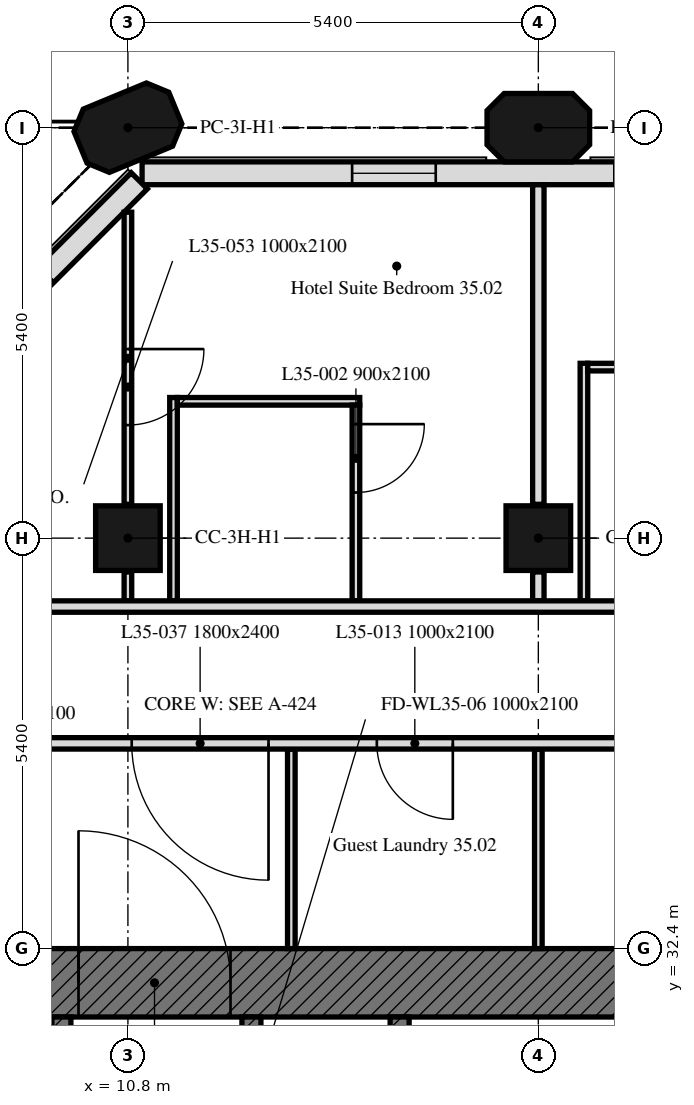
"""IFC4 building model, lengths in metres.
Left out: names, types, materials, properties, quantities, classifications, styles, units other than length and angle.
Written with IfcOpenShell. Run it as: python <this file> out.ifc"""

import sys

from ifc_helpers import new_model, si_unit, direction, frame, frame_2d, origin, origin_2d, place, context, subcontext, project, spatial, polyline, rectangle, outline, extrude, element, fill, save


model = new_model("IFC4")
c1 = context("Model", 3, precision=1e-05, world=origin(), true_north=direction((0.0, 1.0)))
c2 = subcontext(c1, "Body", "Model", "MODEL_VIEW")
j1 = project(units=[si_unit("LENGTHUNIT", "METRE"), si_unit("PLANEANGLEUNIT", "RADIAN")], contexts=[c1])
p1 = place(None, origin())
s1 = spatial("IfcSite", under=j1, at=p1, CompositionType="ELEMENT")
p2 = place(p1, origin())
s2 = spatial("IfcBuilding", under=s1, at=p2, CompositionType="ELEMENT")
p3 = place(p2, frame((0.0, 0.0, 152.8)))
s3 = spatial("IfcBuildingStorey", under=s2, at=p3, CompositionType="ELEMENT", Elevation=152.8)
for number, where, z_axis, x_axis in (
    (1, (10.8, 37.8, 0.0), (0.0, 0.0, 1.0), (1.0, 0.0, 0.0)),
    (2, (16.2, 37.8, 0.0), (0.0, 0.0, 1.0), (1.0, 0.0, 0.0)),
):
    element("IfcColumn", number, at=place(p3, frame(where, z_axis=z_axis, x_axis=x_axis)), inside=s3, PredefinedType="COLUMN", context=c2, shape_type="SweptSolid", body=[
        extrude(rectangle(XDim=0.85, YDim=0.85, at=origin_2d()), origin(), (0.0, 0.0, 1.0), 3.0),
    ])
for number, where, z_axis, x_axis in (
    (3, (10.8, 43.2, 0.0), (0.0, 0.0, 1.0), (0.924, 0.383, 0.0)),
    (4, (16.2, 43.2, 0.0), (0.0, 0.0, 1.0), (1.0, 0.0, 0.0)),
):
    element("IfcColumn", number, at=place(p3, frame(where, z_axis=z_axis, x_axis=x_axis)), inside=s3, PredefinedType="COLUMN", context=c2, shape_type="SweptSolid", body=[
        extrude(outline(polyline([(-0.45, -0.45), (0.45, -0.45), (0.675, -0.225), (0.675, 0.225), (0.45, 0.45), (-0.45, 0.45), (-0.675, 0.225), (-0.675, -0.225), (-0.45, -0.45)])), origin(), (0.0, 0.0, 1.0), 3.0),
    ])
p4 = place(p3, frame((43.014, 42.6, 0.0), z_axis=(0.0, 0.0, 1.0), x_axis=(-1.0, 0.0, 0.0)))
e5 = element("IfcWall", 5, at=p4, inside=s3, PredefinedType="SOLIDWALL", context=c2, shape_type="SweptSolid", body=[
    extrude(rectangle(XDim=32.027, YDim=0.3, at=frame_2d((16.014, 0.0))), origin(), (0.0, 0.0, 1.0), 3.0),
])
p5 = place(p4, frame((0.814, 0.0, 0.9)))
e6 = element("IfcOpeningElement", 6, at=p5, cuts=e5, PredefinedType="OPENING", context=c2, shape_type="SweptSolid", body=[
    extrude(rectangle(XDim=3.4, YDim=1.7, at=frame_2d((1.7, 0.85))), frame((0.0, 0.16, 0.0), z_axis=(0.0, -1.0, 0.0), x_axis=(1.0, 0.0, 0.0)), (0.0, 0.0, 1.0), 0.32),
])
p6 = place(p4, frame((6.564, 0.0, 0.9)))
e7 = element("IfcOpeningElement", 7, at=p6, cuts=e5, PredefinedType="OPENING", context=c2, shape_type="SweptSolid", body=[
    extrude(rectangle(XDim=1.1, YDim=1.7, at=frame_2d((0.55, 0.85))), frame((0.0, 0.16, 0.0), z_axis=(0.0, -1.0, 0.0), x_axis=(1.0, 0.0, 0.0)), (0.0, 0.0, 1.0), 0.32),
])
p7 = place(p4, frame((11.614, 0.0, 0.9)))
e8 = element("IfcOpeningElement", 8, at=p7, cuts=e5, PredefinedType="OPENING", context=c2, shape_type="SweptSolid", body=[
    extrude(rectangle(XDim=3.4, YDim=1.7, at=frame_2d((1.7, 0.85))), frame((0.0, 0.16, 0.0), z_axis=(0.0, -1.0, 0.0), x_axis=(1.0, 0.0, 0.0)), (0.0, 0.0, 1.0), 0.32),
])
p8 = place(p4, frame((17.364, 0.0, 0.9)))
e9 = element("IfcOpeningElement", 9, at=p8, cuts=e5, PredefinedType="OPENING", context=c2, shape_type="SweptSolid", body=[
    extrude(rectangle(XDim=1.1, YDim=1.7, at=frame_2d((0.55, 0.85))), frame((0.0, 0.16, 0.0), z_axis=(0.0, -1.0, 0.0), x_axis=(1.0, 0.0, 0.0)), (0.0, 0.0, 1.0), 0.32),
])
p9 = place(p4, frame((22.414, 0.0, 0.9)))
e10 = element("IfcOpeningElement", 10, at=p9, cuts=e5, PredefinedType="OPENING", context=c2, shape_type="SweptSolid", body=[
    extrude(rectangle(XDim=3.4, YDim=1.7, at=frame_2d((1.7, 0.85))), frame((0.0, 0.16, 0.0), z_axis=(0.0, -1.0, 0.0), x_axis=(1.0, 0.0, 0.0)), (0.0, 0.0, 1.0), 0.32),
])
p10 = place(p4, frame((28.164, 0.0, 0.9)))
e11 = element("IfcOpeningElement", 11, at=p10, cuts=e5, PredefinedType="OPENING", context=c2, shape_type="SweptSolid", body=[
    extrude(rectangle(XDim=1.1, YDim=1.7, at=frame_2d((0.55, 0.85))), frame((0.0, 0.16, 0.0), z_axis=(0.0, -1.0, 0.0), x_axis=(1.0, 0.0, 0.0)), (0.0, 0.0, 1.0), 0.32),
])
p11 = place(p3, frame((10.949, 42.501, 0.0), z_axis=(0.0, 0.0, 1.0), x_axis=(-0.707106781187, -0.707106781187, 0.0)))
e12 = element("IfcWall", 12, at=p11, inside=s3, PredefinedType="SOLIDWALL", context=c2, shape_type="SweptSolid", body=[
    extrude(rectangle(XDim=6.86, YDim=0.3, at=frame_2d((3.43, 0.0))), origin(), (0.0, 0.0, 1.0), 3.0),
])
p12 = place(p11, frame((1.73, 0.0, 0.9)))
e13 = element("IfcOpeningElement", 13, at=p12, cuts=e12, PredefinedType="OPENING", context=c2, shape_type="SweptSolid", body=[
    extrude(rectangle(XDim=3.4, YDim=1.7, at=frame_2d((1.7, 0.85))), frame((0.0, 0.16, 0.0), z_axis=(0.0, -1.0, 0.0), x_axis=(1.0, 0.0, 0.0)), (0.0, 0.0, 1.0), 0.32),
])
p13 = place(p3, frame((6.6, 31.95, 0.0), z_axis=(0.0, 0.0, 1.0), x_axis=(1.0, 0.0, 0.0)))
e14 = element("IfcWall", 14, at=p13, inside=s3, PredefinedType="SOLIDWALL", context=c2, shape_type="SweptSolid", body=[
    extrude(rectangle(XDim=11.1, YDim=0.9, at=frame_2d((5.55, 0.0))), origin(), (0.0, 0.0, 1.0), 3.0),
])
p14 = place(p13, frame((3.55, 0.0, 0.0)))
e15 = element("IfcOpeningElement", 15, at=p14, cuts=e14, PredefinedType="OPENING", context=c2, shape_type="SweptSolid", body=[
    extrude(rectangle(XDim=2.0, YDim=2.4, at=frame_2d((1.0, 1.2))), frame((0.0, 0.45, 0.0), z_axis=(0.0, -1.0, 0.0), x_axis=(1.0, 0.0, 0.0)), (0.0, 0.0, 1.0), 0.9),
])
p15 = place(p3, frame((9.925, 17.1, 0.0), z_axis=(0.0, 0.0, 1.0), x_axis=(0.0, 1.0, 0.0)))
e16 = element("IfcWall", 16, at=p15, inside=s3, PredefinedType="SOLIDWALL", context=c2, shape_type="SweptSolid", body=[
    extrude(rectangle(XDim=14.4, YDim=0.25, at=frame_2d((7.2, 0.0))), origin(), (0.0, 0.0, 1.0), 3.0),
])
p16 = place(p15, frame((4.6, 0.0, 0.0)))
e17 = element("IfcOpeningElement", 17, at=p16, cuts=e16, PredefinedType="OPENING", context=c2, shape_type="SweptSolid", body=[
    extrude(rectangle(XDim=1.0, YDim=2.1, at=frame_2d((0.5, 1.05))), frame((0.0, 0.125, 0.0), z_axis=(0.0, -1.0, 0.0), x_axis=(1.0, 0.0, 0.0)), (0.0, 0.0, 1.0), 0.25),
])
p17 = place(p15, frame((7.062, 0.0, 0.0)))
e18 = element("IfcOpeningElement", 18, at=p17, cuts=e16, PredefinedType="OPENING", context=c2, shape_type="SweptSolid", body=[
    extrude(rectangle(XDim=1.2, YDim=2.1, at=frame_2d((0.6, 1.05))), frame((0.0, 0.125, 0.0), z_axis=(0.0, -1.0, 0.0), x_axis=(1.0, 0.0, 0.0)), (0.0, 0.0, 1.0), 0.25),
])
p18 = place(p15, frame((9.472, 0.0, 0.0)))
e19 = element("IfcOpeningElement", 19, at=p18, cuts=e16, PredefinedType="OPENING", context=c2, shape_type="SweptSolid", body=[
    extrude(rectangle(XDim=0.9, YDim=2.1, at=frame_2d((0.45, 1.05))), frame((0.0, 0.125, 0.0), z_axis=(0.0, -1.0, 0.0), x_axis=(1.0, 0.0, 0.0)), (0.0, 0.0, 1.0), 0.25),
])
p19 = place(p15, frame((11.159, 0.0, 0.0)))
e20 = element("IfcOpeningElement", 20, at=p19, cuts=e16, PredefinedType="OPENING", context=c2, shape_type="SweptSolid", body=[
    extrude(rectangle(XDim=0.9, YDim=2.1, at=frame_2d((0.45, 1.05))), frame((0.0, 0.125, 0.0), z_axis=(0.0, -1.0, 0.0), x_axis=(1.0, 0.0, 0.0)), (0.0, 0.0, 1.0), 0.25),
])
p20 = place(p15, frame((13.1, 0.0, 0.0)))
e21 = element("IfcOpeningElement", 21, at=p20, cuts=e16, PredefinedType="OPENING", context=c2, shape_type="SweptSolid", body=[
    extrude(rectangle(XDim=0.9, YDim=2.1, at=frame_2d((0.45, 1.05))), frame((0.0, 0.125, 0.0), z_axis=(0.0, -1.0, 0.0), x_axis=(1.0, 0.0, 0.0)), (0.0, 0.0, 1.0), 0.25),
])
p21 = place(p3, frame((14.375, 17.1, 0.0), z_axis=(0.0, 0.0, 1.0), x_axis=(0.0, 1.0, 0.0)))
e22 = element("IfcWall", 22, at=p21, inside=s3, PredefinedType="SOLIDWALL", context=c2, shape_type="SweptSolid", body=[
    extrude(rectangle(XDim=14.4, YDim=0.25, at=frame_2d((7.2, 0.0))), origin(), (0.0, 0.0, 1.0), 3.0),
])
p22 = place(p21, frame((13.15, 0.0, 0.0)))
e23 = element("IfcOpeningElement", 23, at=p22, cuts=e22, PredefinedType="OPENING", context=c2, shape_type="SweptSolid", body=[
    extrude(rectangle(XDim=1.0, YDim=2.1, at=frame_2d((0.5, 1.05))), frame((0.0, 0.125, 0.0), z_axis=(0.0, -1.0, 0.0), x_axis=(1.0, 0.0, 0.0)), (0.0, 0.0, 1.0), 0.25),
])
p23 = place(p21, frame((0.6, 0.0, 0.0)))
e24 = element("IfcOpeningElement", 24, at=p23, cuts=e22, PredefinedType="OPENING", context=c2, shape_type="SweptSolid", body=[
    extrude(rectangle(XDim=1.1, YDim=2.1, at=frame_2d((0.55, 1.05))), frame((0.0, 0.125, 0.0), z_axis=(0.0, -1.0, 0.0), x_axis=(1.0, 0.0, 0.0)), (0.0, 0.0, 1.0), 0.25),
])
p24 = place(p21, frame((3.25, 0.0, 0.0)))
e25 = element("IfcOpeningElement", 25, at=p24, cuts=e22, PredefinedType="OPENING", context=c2, shape_type="SweptSolid", body=[
    extrude(rectangle(XDim=0.9, YDim=2.1, at=frame_2d((0.45, 1.05))), frame((0.0, 0.125, 0.0), z_axis=(0.0, -1.0, 0.0), x_axis=(1.0, 0.0, 0.0)), (0.0, 0.0, 1.0), 0.25),
])
p25 = place(p3, frame((12.425, 29.4, 0.0), z_axis=(0.0, 0.0, 1.0), x_axis=(0.0, 1.0, 0.0)))
e26 = element("IfcWall", 26, at=p25, inside=s3, PredefinedType="SOLIDWALL", context=c2, shape_type="SweptSolid", body=[
    extrude(rectangle(XDim=2.1, YDim=0.25, at=frame_2d((1.05, 0.0))), origin(), (0.0, 0.0, 1.0), 3.0),
])
p26 = place(p25, frame((0.5, 0.0, 0.0)))
e27 = element("IfcOpeningElement", 27, at=p26, cuts=e26, PredefinedType="OPENING", context=c2, shape_type="SweptSolid", body=[
    extrude(rectangle(XDim=1.0, YDim=2.1, at=frame_2d((0.5, 1.05))), frame((0.0, 0.125, 0.0), z_axis=(0.0, -1.0, 0.0), x_axis=(1.0, 0.0, 0.0)), (0.0, 0.0, 1.0), 0.25),
])
p27 = place(p3, frame((10.8, 42.088, 0.0), z_axis=(0.0, 0.0, 1.0), x_axis=(0.0, -1.0, 0.0)))
e28 = element("IfcWall", 28, at=p27, inside=s3, PredefinedType="PARTITIONING", context=c2, shape_type="SweptSolid", body=[
    extrude(rectangle(XDim=3.843, YDim=0.1, at=frame_2d((1.921, 0.0))), origin(), (0.0, 0.0, 1.0), 3.0),
])
p28 = place(p27, frame((1.8, 0.0, 0.0)))
e29 = element("IfcOpeningElement", 29, at=p28, cuts=e28, PredefinedType="OPENING", context=c2, shape_type="SweptSolid", body=[
    extrude(rectangle(XDim=1.0, YDim=2.1, at=frame_2d((0.5, 1.05))), frame((0.0, 0.05, 0.0), z_axis=(0.0, -1.0, 0.0), x_axis=(1.0, 0.0, 0.0)), (0.0, 0.0, 1.0), 0.1),
])
p29 = place(p3, frame((10.8, 37.355, 0.0), z_axis=(0.0, 0.0, 1.0), x_axis=(0.0, -1.0, 0.0)))
e30 = element("IfcWall", 30, at=p29, inside=s3, PredefinedType="PARTITIONING", context=c2, shape_type="SweptSolid", body=[
    extrude(rectangle(XDim=0.38, YDim=0.1, at=frame_2d((0.19, 0.0))), origin(), (0.0, 0.0, 1.0), 3.0),
])
p30 = place(p3, frame((11.4, 36.975, 0.0), z_axis=(0.0, 0.0, 1.0), x_axis=(0.0, 1.0, 0.0)))
e31 = element("IfcWall", 31, at=p30, inside=s3, PredefinedType="PARTITIONING", context=c2, shape_type="SweptSolid", body=[
    extrude(rectangle(XDim=2.675, YDim=0.1, at=frame_2d((1.337, 0.0))), origin(), (0.0, 0.0, 1.0), 3.0),
])
p31 = place(p3, frame((11.45, 39.6, 0.0), z_axis=(0.0, 0.0, 1.0), x_axis=(1.0, 0.0, 0.0)))
e32 = element("IfcWall", 32, at=p31, inside=s3, PredefinedType="PARTITIONING", context=c2, shape_type="SweptSolid", body=[
    extrude(rectangle(XDim=2.4, YDim=0.1, at=frame_2d((1.2, 0.0))), origin(), (0.0, 0.0, 1.0), 3.0),
])
p32 = place(p3, frame((13.8, 39.55, 0.0), z_axis=(0.0, 0.0, 1.0), x_axis=(0.0, -1.0, 0.0)))
e33 = element("IfcWall", 33, at=p32, inside=s3, PredefinedType="PARTITIONING", context=c2, shape_type="SweptSolid", body=[
    extrude(rectangle(XDim=2.575, YDim=0.1, at=frame_2d((1.288, 0.0))), origin(), (0.0, 0.0, 1.0), 3.0),
])
p33 = place(p32, frame((0.25, 0.0, 0.0)))
e34 = element("IfcOpeningElement", 34, at=p33, cuts=e33, PredefinedType="OPENING", context=c2, shape_type="SweptSolid", body=[
    extrude(rectangle(XDim=0.9, YDim=2.1, at=frame_2d((0.45, 1.05))), frame((0.0, 0.05, 0.0), z_axis=(0.0, -1.0, 0.0), x_axis=(1.0, 0.0, 0.0)), (0.0, 0.0, 1.0), 0.1),
])
p34 = place(p3, frame((16.2, 36.975, 0.0), z_axis=(0.0, 0.0, 1.0), x_axis=(0.0, 1.0, 0.0)))
e35 = element("IfcWall", 35, at=p34, inside=s3, PredefinedType="PARTITIONING", context=c2, shape_type="SweptSolid", body=[
    extrude(rectangle(XDim=0.38, YDim=0.15, at=frame_2d((0.19, 0.0))), origin(), (0.0, 0.0, 1.0), 3.0),
])
p35 = place(p3, frame((16.2, 38.245, 0.0), z_axis=(0.0, 0.0, 1.0), x_axis=(0.0, 1.0, 0.0)))
e36 = element("IfcWall", 36, at=p35, inside=s3, PredefinedType="PARTITIONING", context=c2, shape_type="SweptSolid", body=[
    extrude(rectangle(XDim=4.204, YDim=0.15, at=frame_2d((2.102, 0.0))), origin(), (0.0, 0.0, 1.0), 3.0),
])
p36 = place(p3, frame((16.8, 36.975, 0.0), z_axis=(0.0, 0.0, 1.0), x_axis=(0.0, 1.0, 0.0)))
e37 = element("IfcWall", 37, at=p36, inside=s3, PredefinedType="PARTITIONING", context=c2, shape_type="SweptSolid", body=[
    extrude(rectangle(XDim=3.125, YDim=0.1, at=frame_2d((1.562, 0.0))), origin(), (0.0, 0.0, 1.0), 3.0),
])
p37 = place(p3, frame((16.85, 40.05, 0.0), z_axis=(0.0, 0.0, 1.0), x_axis=(1.0, 0.0, 0.0)))
e38 = element("IfcWall", 38, at=p37, inside=s3, PredefinedType="PARTITIONING", context=c2, shape_type="SweptSolid", body=[
    extrude(rectangle(XDim=2.1, YDim=0.1, at=frame_2d((1.05, 0.0))), origin(), (0.0, 0.0, 1.0), 3.0),
])
p38 = place(p3, frame((47.849, 36.9, 0.0), z_axis=(0.0, 0.0, 1.0), x_axis=(-1.0, 0.0, 0.0)))
e39 = element("IfcWall", 39, at=p38, inside=s3, PredefinedType="PARTITIONING", context=c2, shape_type="SweptSolid", body=[
    extrude(rectangle(XDim=41.698, YDim=0.15, at=frame_2d((20.849, 0.0))), origin(), (0.0, 0.0, 1.0), 3.0),
])
p39 = place(p38, frame((27.649, 0.0, 0.0)))
e40 = element("IfcOpeningElement", 40, at=p39, cuts=e39, PredefinedType="OPENING", context=c2, shape_type="SweptSolid", body=[
    extrude(rectangle(XDim=1.0, YDim=2.1, at=frame_2d((0.5, 1.05))), frame((0.0, 0.075, 0.0), z_axis=(0.0, -1.0, 0.0), x_axis=(1.0, 0.0, 0.0)), (0.0, 0.0, 1.0), 0.15),
])
p40 = place(p38, frame((22.249, 0.0, 0.0)))
e41 = element("IfcOpeningElement", 41, at=p40, cuts=e39, PredefinedType="OPENING", context=c2, shape_type="SweptSolid", body=[
    extrude(rectangle(XDim=1.0, YDim=2.1, at=frame_2d((0.5, 1.05))), frame((0.0, 0.075, 0.0), z_axis=(0.0, -1.0, 0.0), x_axis=(1.0, 0.0, 0.0)), (0.0, 0.0, 1.0), 0.15),
])
p41 = place(p38, frame((16.849, 0.0, 0.0)))
e42 = element("IfcOpeningElement", 42, at=p41, cuts=e39, PredefinedType="OPENING", context=c2, shape_type="SweptSolid", body=[
    extrude(rectangle(XDim=1.0, YDim=2.1, at=frame_2d((0.5, 1.05))), frame((0.0, 0.075, 0.0), z_axis=(0.0, -1.0, 0.0), x_axis=(1.0, 0.0, 0.0)), (0.0, 0.0, 1.0), 0.15),
])
p42 = place(p38, frame((11.449, 0.0, 0.0)))
e43 = element("IfcOpeningElement", 43, at=p42, cuts=e39, PredefinedType="OPENING", context=c2, shape_type="SweptSolid", body=[
    extrude(rectangle(XDim=1.0, YDim=2.1, at=frame_2d((0.5, 1.05))), frame((0.0, 0.075, 0.0), z_axis=(0.0, -1.0, 0.0), x_axis=(1.0, 0.0, 0.0)), (0.0, 0.0, 1.0), 0.15),
])
p43 = place(p38, frame((2.744, 0.0, 0.0)))
e44 = element("IfcOpeningElement", 44, at=p43, cuts=e39, PredefinedType="OPENING", context=c2, shape_type="SweptSolid", body=[
    extrude(rectangle(XDim=1.0, YDim=2.1, at=frame_2d((0.5, 1.05))), frame((0.0, 0.075, 0.0), z_axis=(0.0, -1.0, 0.0), x_axis=(1.0, 0.0, 0.0)), (0.0, 0.0, 1.0), 0.15),
])
p44 = place(p38, frame((39.249, 0.0, 0.0)))
e45 = element("IfcOpeningElement", 45, at=p44, cuts=e39, PredefinedType="OPENING", context=c2, shape_type="SweptSolid", body=[
    extrude(rectangle(XDim=1.0, YDim=2.1, at=frame_2d((0.5, 1.05))), frame((0.0, 0.075, 0.0), z_axis=(0.0, -1.0, 0.0), x_axis=(1.0, 0.0, 0.0)), (0.0, 0.0, 1.0), 0.15),
])
for number, where, z_axis, x_axis in (
    (46, (16.2, 35.025, 0.0), (0.0, 0.0, 1.0), (0.0, -1.0, 0.0)),
    (47, (12.95, 32.4, 0.0), (0.0, 0.0, 1.0), (0.0, 1.0, 0.0)),
):
    element("IfcWall", number, at=place(p3, frame(where, z_axis=z_axis, x_axis=x_axis)), inside=s3, PredefinedType="PARTITIONING", context=c2, shape_type="SweptSolid", body=[
        extrude(rectangle(XDim=2.625, YDim=0.1, at=frame_2d((1.312, 0.0))), origin(), (0.0, 0.0, 1.0), 3.0),
    ])
p45 = place(p3, frame((43.275, 35.1, 0.0), z_axis=(0.0, 0.0, 1.0), x_axis=(-1.0, 0.0, 0.0)))
e48 = element("IfcWall", 48, at=p45, inside=s3, PredefinedType="PARTITIONING", context=c2, shape_type="SweptSolid", body=[
    extrude(rectangle(XDim=37.124, YDim=0.15, at=frame_2d((18.562, 0.0))), origin(), (0.0, 0.0, 1.0), 3.0),
])
p46 = place(p45, frame((18.475, 0.0, 0.0)))
e49 = element("IfcOpeningElement", 49, at=p46, cuts=e48, PredefinedType="OPENING", context=c2, shape_type="SweptSolid", body=[
    extrude(rectangle(XDim=1.0, YDim=2.1, at=frame_2d((0.5, 1.05))), frame((0.0, 0.075, 0.0), z_axis=(0.0, -1.0, 0.0), x_axis=(1.0, 0.0, 0.0)), (0.0, 0.0, 1.0), 0.15),
])
p47 = place(p45, frame((34.095, 0.0, 0.0)))
e50 = element("IfcOpeningElement", 50, at=p47, cuts=e48, PredefinedType="OPENING", context=c2, shape_type="SweptSolid", body=[
    extrude(rectangle(XDim=1.0, YDim=2.1, at=frame_2d((0.5, 1.05))), frame((0.0, 0.075, 0.0), z_axis=(0.0, -1.0, 0.0), x_axis=(1.0, 0.0, 0.0)), (0.0, 0.0, 1.0), 0.15),
])
p48 = place(p45, frame((8.75, 0.0, 0.0)))
e51 = element("IfcOpeningElement", 51, at=p48, cuts=e48, PredefinedType="OPENING", context=c2, shape_type="SweptSolid", body=[
    extrude(rectangle(XDim=1.0, YDim=2.1, at=frame_2d((0.5, 1.05))), frame((0.0, 0.075, 0.0), z_axis=(0.0, -1.0, 0.0), x_axis=(1.0, 0.0, 0.0)), (0.0, 0.0, 1.0), 0.15),
])
p49 = place(p45, frame((1.55, 0.0, 0.0)))
e52 = element("IfcOpeningElement", 52, at=p49, cuts=e48, PredefinedType="OPENING", context=c2, shape_type="SweptSolid", body=[
    extrude(rectangle(XDim=1.0, YDim=2.1, at=frame_2d((0.5, 1.05))), frame((0.0, 0.075, 0.0), z_axis=(0.0, -1.0, 0.0), x_axis=(1.0, 0.0, 0.0)), (0.0, 0.0, 1.0), 0.15),
])
p50 = place(p45, frame((28.2, 0.0, 0.0)))
e53 = element("IfcOpeningElement", 53, at=p50, cuts=e48, PredefinedType="OPENING", context=c2, shape_type="SweptSolid", body=[
    extrude(rectangle(XDim=1.0, YDim=2.1, at=frame_2d((0.5, 1.05))), frame((0.0, 0.075, 0.0), z_axis=(0.0, -1.0, 0.0), x_axis=(1.0, 0.0, 0.0)), (0.0, 0.0, 1.0), 0.15),
])
p51 = place(p45, frame((30.625, 0.0, 0.0)))
e54 = element("IfcOpeningElement", 54, at=p51, cuts=e48, PredefinedType="OPENING", context=c2, shape_type="SweptSolid", body=[
    extrude(rectangle(XDim=1.8, YDim=2.4, at=frame_2d((0.9, 1.2))), frame((0.0, 0.075, 0.0), z_axis=(0.0, -1.0, 0.0), x_axis=(1.0, 0.0, 0.0)), (0.0, 0.0, 1.0), 0.15),
])
p52 = place(p45, frame((5.525, 0.0, 0.0)))
e55 = element("IfcOpeningElement", 55, at=p52, cuts=e48, PredefinedType="OPENING", context=c2, shape_type="SweptSolid", body=[
    extrude(rectangle(XDim=1.8, YDim=2.4, at=frame_2d((0.9, 1.2))), frame((0.0, 0.075, 0.0), z_axis=(0.0, -1.0, 0.0), x_axis=(1.0, 0.0, 0.0)), (0.0, 0.0, 1.0), 0.15),
])
p53 = place(p10, origin())
e56 = element("IfcWindow", 56, at=p53, inside=s3, PartitioningType="SINGLE_PANEL", PredefinedType="WINDOW", context=c2, shape_type="SweptSolid", body=[
    extrude(rectangle(XDim=1.1, YDim=1.7, at=frame_2d((0.55, 0.85))), frame((0.0, 0.03, 0.0), z_axis=(0.0, -1.0, 0.0), x_axis=(1.0, 0.0, 0.0)), (0.0, 0.0, 1.0), 0.06),
])
fill(e11, e56)
p54 = place(p14, origin())
e57 = element("IfcDoor", 57, at=p54, inside=s3, OperationType="DOUBLE_DOOR_SINGLE_SWING", PredefinedType="DOOR", context=c2, shape_type="SweptSolid", body=[
    extrude(rectangle(XDim=2.0, YDim=2.4, at=frame_2d((1.0, 1.2))), frame((0.0, 0.025, 0.0), z_axis=(0.0, -1.0, 0.0), x_axis=(1.0, 0.0, 0.0)), (0.0, 0.0, 1.0), 0.05),
])
fill(e15, e57)
p55 = place(p33, origin())
e58 = element("IfcDoor", 58, at=p55, inside=s3, OperationType="SINGLE_SWING_LEFT", PredefinedType="DOOR", context=c2, shape_type="SweptSolid", body=[
    extrude(rectangle(XDim=0.9, YDim=2.1, at=frame_2d((0.45, 1.05))), frame((0.0, 0.025, 0.0), z_axis=(0.0, -1.0, 0.0), x_axis=(1.0, 0.0, 0.0)), (0.0, 0.0, 1.0), 0.05),
])
fill(e34, e58)
p56 = place(p50, origin())
e59 = element("IfcDoor", 59, at=p56, inside=s3, OperationType="SINGLE_SWING_RIGHT", PredefinedType="DOOR", context=c2, shape_type="SweptSolid", body=[
    extrude(rectangle(XDim=1.0, YDim=2.1, at=frame_2d((0.5, 1.05))), frame((0.0, 0.025, 0.0), z_axis=(0.0, -1.0, 0.0), x_axis=(1.0, 0.0, 0.0)), (0.0, 0.0, 1.0), 0.05),
])
fill(e53, e59)
p57 = place(p51, origin())
e60 = element("IfcDoor", 60, at=p57, inside=s3, OperationType="DOUBLE_DOOR_SINGLE_SWING", PredefinedType="DOOR", context=c2, shape_type="SweptSolid", body=[
    extrude(rectangle(XDim=1.8, YDim=2.4, at=frame_2d((0.9, 1.2))), frame((0.0, 0.025, 0.0), z_axis=(0.0, -1.0, 0.0), x_axis=(1.0, 0.0, 0.0)), (0.0, 0.0, 1.0), 0.05),
])
fill(e54, e60)
p58 = place(p28, origin())
e61 = element("IfcDoor", 61, at=p58, inside=s3, OperationType="SINGLE_SWING_LEFT", PredefinedType="DOOR", context=c2, shape_type="SweptSolid", body=[
    extrude(rectangle(XDim=1.0, YDim=2.1, at=frame_2d((0.5, 1.05))), frame((0.0, 0.025, 0.0), z_axis=(0.0, -1.0, 0.0), x_axis=(1.0, 0.0, 0.0)), (0.0, 0.0, 1.0), 0.05),
])
fill(e29, e61)
save(model, sys.argv[1])
